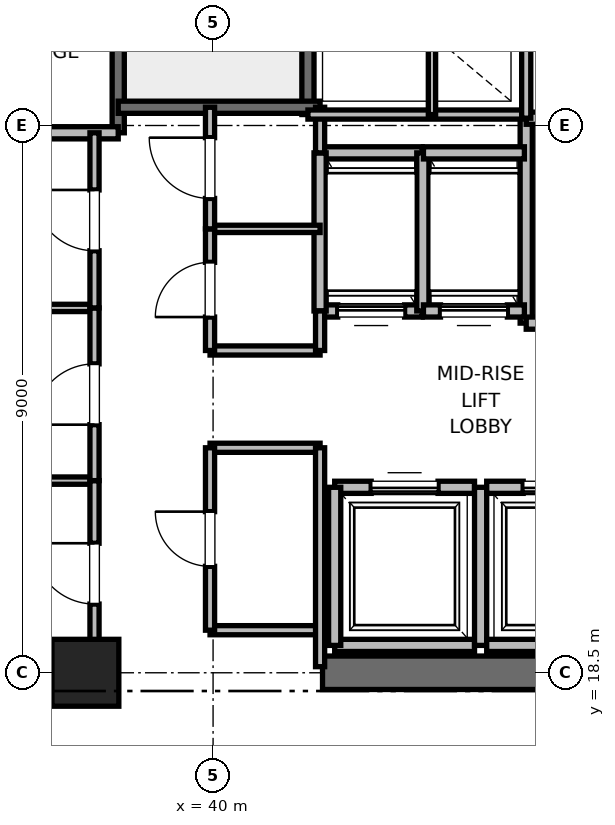
"""IFC4 building model, lengths in metres.
Left out: names, types, materials, properties, quantities, classifications, styles, units other than length and angle.
Written with IfcOpenShell. Run it as: python <this file> out.ifc"""

import sys

from ifc_helpers import new_model, si_unit, direction, frame, frame_2d, origin, origin_2d, place, context, subcontext, project, spatial, rectangle, extrude, element, fill, save


model = new_model("IFC4")
c1 = context("Model", 3, precision=1e-05, world=origin(), true_north=direction((0.0, 1.0)))
c2 = subcontext(c1, "Body", "Model", "MODEL_VIEW")
j1 = project(units=[si_unit("LENGTHUNIT", "METRE"), si_unit("PLANEANGLEUNIT", "RADIAN")], contexts=[c1])
p1 = place(None, origin())
s1 = spatial("IfcSite", under=j1, at=p1, CompositionType="ELEMENT")
p2 = place(p1, origin())
s2 = spatial("IfcBuilding", under=s1, at=p2, CompositionType="ELEMENT")
p3 = place(p2, frame((0.0, 0.0, 148.4)))
s3 = spatial("IfcBuildingStorey", under=s2, at=p3, CompositionType="ELEMENT", Elevation=148.4)
p4 = place(p3, frame((37.9, 18.5, 0.0), z_axis=(0.0, 0.0, 1.0), x_axis=(1.0, 0.0, 0.0)))
e1 = element("IfcColumn", 1, at=p4, inside=s3, PredefinedType="PILASTER", context=c2, shape_type="SweptSolid", body=[
    extrude(rectangle(XDim=1.1, YDim=1.1, at=origin_2d()), origin(), (0.0, 0.0, 1.0), 4.0),
])
for number, where, z_axis, x_axis in (
    (2, (29.0, 18.5, 0.0), (0.0, 0.0, 1.0), (1.0, 0.0, 0.0)),
    (3, (41.8, 18.5, 0.0), (0.0, 0.0, 1.0), (1.0, 0.0, 0.0)),
):
    element("IfcWall", number, at=place(p3, frame(where, z_axis=z_axis, x_axis=x_axis)), inside=s3, PredefinedType="SHEAR", context=c2, shape_type="SweptSolid", body=[
        extrude(rectangle(XDim=9.2, YDim=0.55, at=frame_2d((4.6, 0.0))), origin(), (0.0, 0.0, 1.0), 3.775),
    ])
p5 = place(p3, frame((38.44, 27.38, 0.0), z_axis=(0.0, 0.0, 1.0), x_axis=(0.0, 1.0, 0.0)))
e4 = element("IfcWall", 4, at=p5, inside=s3, PredefinedType="SOLIDWALL", context=c2, shape_type="SweptSolid", body=[
    extrude(rectangle(XDim=8.87, YDim=0.2, at=frame_2d((4.435, 0.0))), origin(), (0.0, 0.0, 1.0), 3.775),
])
p6 = place(p3, frame((41.56, 27.68, 0.0), z_axis=(0.0, 0.0, 1.0), x_axis=(0.0, 1.0, 0.0)))
e5 = element("IfcWall", 5, at=p6, inside=s3, PredefinedType="SOLIDWALL", context=c2, shape_type="SweptSolid", body=[
    extrude(rectangle(XDim=8.57, YDim=0.2, at=frame_2d((4.285, 0.0))), origin(), (0.0, 0.0, 1.0), 3.775),
])
p7 = place(p3, frame((38.44, 27.8, 0.0), z_axis=(0.0, 0.0, 1.0), x_axis=(1.0, 0.0, 0.0)))
e6 = element("IfcWall", 6, at=p7, inside=s3, PredefinedType="SOLIDWALL", context=c2, shape_type="SweptSolid", body=[
    extrude(rectangle(XDim=3.32, YDim=0.2, at=frame_2d((1.66, 0.0))), origin(), (0.0, 0.0, 1.0), 3.775),
])
p8 = place(p3, frame((32.82, 27.38, 0.0), z_axis=(0.0, 0.0, 1.0), x_axis=(1.0, 0.0, 0.0)))
e7 = element("IfcWall", 7, at=p8, inside=s3, PredefinedType="PARTITIONING", context=c2, shape_type="SweptSolid", body=[
    extrude(rectangle(XDim=5.62, YDim=0.2, at=frame_2d((2.81, 0.0))), origin(), (0.0, 0.0, 1.0), 3.775),
])
p9 = place(p3, frame((45.15, 24.25, 0.0), z_axis=(0.0, 0.0, 1.0), x_axis=(0.0, 1.0, 0.0)))
e8 = element("IfcWall", 8, at=p9, inside=s3, PredefinedType="PARTITIONING", context=c2, shape_type="SweptSolid", body=[
    extrude(rectangle(XDim=3.37, YDim=0.2, at=frame_2d((1.685, 0.0))), origin(), (0.0, 0.0, 1.0), 3.775),
])
p10 = place(p3, frame((45.15, 24.25, 0.0), z_axis=(0.0, 0.0, 1.0), x_axis=(1.0, 0.0, 0.0)))
e9 = element("IfcWall", 9, at=p10, inside=s3, PredefinedType="PARTITIONING", context=c2, shape_type="SweptSolid", body=[
    extrude(rectangle(XDim=2.7, YDim=0.2, at=frame_2d((1.35, 0.0))), origin(), (0.0, 0.0, 1.0), 3.775),
])
p11 = place(p10, frame((0.775, 0.0, 0.0)))
e10 = element("IfcOpeningElement", 10, at=p11, cuts=e9, PredefinedType="OPENING", context=c2, shape_type="SweptSolid", body=[
    extrude(rectangle(XDim=1.15, YDim=2.2, at=frame_2d((0.575, 1.1))), frame((0.0, 0.1, 0.0), z_axis=(0.0, -1.0, 0.0), x_axis=(1.0, 0.0, 0.0)), (0.0, 0.0, 1.0), 0.2),
])
p12 = place(p3, frame((45.15, 27.62, 0.0), z_axis=(0.0, 0.0, 1.0), x_axis=(1.0, 0.0, 0.0)))
e11 = element("IfcWall", 11, at=p12, inside=s3, PredefinedType="PARTITIONING", context=c2, shape_type="SweptSolid", body=[
    extrude(rectangle(XDim=2.03, YDim=0.2, at=frame_2d((1.015, 0.0))), origin(), (0.0, 0.0, 1.0), 3.775),
])
p13 = place(p12, frame((0.44, 0.0, 0.0)))
e12 = element("IfcOpeningElement", 12, at=p13, cuts=e11, PredefinedType="OPENING", context=c2, shape_type="SweptSolid", body=[
    extrude(rectangle(XDim=1.15, YDim=2.2, at=frame_2d((0.575, 1.1))), frame((0.0, 0.1, 0.0), z_axis=(0.0, -1.0, 0.0), x_axis=(1.0, 0.0, 0.0)), (0.0, 0.0, 1.0), 0.2),
])
p14 = place(p3, frame((42.0, 18.95, 0.0), z_axis=(0.0, 0.0, 1.0), x_axis=(1.0, 0.0, 0.0)))
e13 = element("IfcWall", 13, at=p14, inside=s3, PredefinedType="SOLIDWALL", context=c2, shape_type="SweptSolid", body=[
    extrude(rectangle(XDim=2.3, YDim=0.2, at=frame_2d((1.15, 0.0))), origin(), (0.0, 0.0, 1.0), 2.755),
])
p15 = place(p3, frame((44.3, 21.55, 0.0), z_axis=(0.0, 0.0, 1.0), x_axis=(-1.0, 0.0, 0.0)))
e14 = element("IfcWall", 14, at=p15, inside=s3, PredefinedType="SOLIDWALL", context=c2, shape_type="SweptSolid", body=[
    extrude(rectangle(XDim=2.3, YDim=0.2, at=frame_2d((1.15, 0.0))), origin(), (0.0, 0.0, 1.0), 3.775),
])
p16 = place(p15, frame((0.6, 0.0, 0.0)))
e15 = element("IfcOpeningElement", 15, at=p16, cuts=e14, PredefinedType="OPENING", context=c2, shape_type="SweptSolid", body=[
    extrude(rectangle(XDim=1.1, YDim=2.2, at=frame_2d((0.55, 1.1))), frame((0.0, 0.1, 0.0), z_axis=(0.0, -1.0, 0.0), x_axis=(1.0, 0.0, 0.0)), (0.0, 0.0, 1.0), 0.2),
])
p17 = place(p3, frame((42.0, 21.55, 0.0), z_axis=(0.0, 0.0, 1.0), x_axis=(0.0, -1.0, 0.0)))
e16 = element("IfcWall", 16, at=p17, inside=s3, PredefinedType="SOLIDWALL", context=c2, shape_type="SweptSolid", body=[
    extrude(rectangle(XDim=2.6, YDim=0.2, at=frame_2d((1.3, 0.0))), origin(), (0.0, 0.0, 1.0), 2.755),
])
p18 = place(p3, frame((44.4, 18.95, 0.0), z_axis=(0.0, 0.0, 1.0), x_axis=(0.0, 1.0, 0.0)))
e17 = element("IfcWall", 17, at=p18, inside=s3, PredefinedType="SOLIDWALL", context=c2, shape_type="SweptSolid", body=[
    extrude(rectangle(XDim=2.6, YDim=0.2, at=frame_2d((1.3, 0.0))), origin(), (0.0, 0.0, 1.0), 3.775),
])
p19 = place(p3, frame((44.5, 18.95, 0.0), z_axis=(0.0, 0.0, 1.0), x_axis=(1.0, 0.0, 0.0)))
e18 = element("IfcWall", 18, at=p19, inside=s3, PredefinedType="SOLIDWALL", context=c2, shape_type="SweptSolid", body=[
    extrude(rectangle(XDim=2.3, YDim=0.2, at=frame_2d((1.15, 0.0))), origin(), (0.0, 0.0, 1.0), 3.775),
])
p20 = place(p3, frame((46.8, 21.55, 0.0), z_axis=(0.0, 0.0, 1.0), x_axis=(-1.0, 0.0, 0.0)))
e19 = element("IfcWall", 19, at=p20, inside=s3, PredefinedType="SOLIDWALL", context=c2, shape_type="SweptSolid", body=[
    extrude(rectangle(XDim=2.3, YDim=0.2, at=frame_2d((1.15, 0.0))), origin(), (0.0, 0.0, 1.0), 3.775),
])
p21 = place(p20, frame((0.6, 0.0, 0.0)))
e20 = element("IfcOpeningElement", 20, at=p21, cuts=e19, PredefinedType="OPENING", context=c2, shape_type="SweptSolid", body=[
    extrude(rectangle(XDim=1.1, YDim=2.2, at=frame_2d((0.55, 1.1))), frame((0.0, 0.1, 0.0), z_axis=(0.0, -1.0, 0.0), x_axis=(1.0, 0.0, 0.0)), (0.0, 0.0, 1.0), 0.2),
])
p22 = place(p3, frame((41.76, 24.45, 0.0), z_axis=(0.0, 0.0, 1.0), x_axis=(1.0, 0.0, 0.0)))
e21 = element("IfcWall", 21, at=p22, inside=s3, PredefinedType="SOLIDWALL", context=c2, shape_type="SweptSolid", body=[
    extrude(rectangle(XDim=1.68, YDim=0.2, at=frame_2d((0.84, 0.0))), origin(), (0.0, 0.0, 1.0), 3.775),
])
p23 = place(p22, frame((0.29, 0.0, 0.0)))
e22 = element("IfcOpeningElement", 22, at=p23, cuts=e21, PredefinedType="OPENING", context=c2, shape_type="SweptSolid", body=[
    extrude(rectangle(XDim=1.1, YDim=2.2, at=frame_2d((0.55, 1.1))), frame((0.0, 0.1, 0.0), z_axis=(0.0, -1.0, 0.0), x_axis=(1.0, 0.0, 0.0)), (0.0, 0.0, 1.0), 0.2),
])
p24 = place(p3, frame((43.44, 27.05, 0.0), z_axis=(0.0, 0.0, 1.0), x_axis=(-1.0, 0.0, 0.0)))
e23 = element("IfcWall", 23, at=p24, inside=s3, PredefinedType="SOLIDWALL", context=c2, shape_type="SweptSolid", body=[
    extrude(rectangle(XDim=1.68, YDim=0.2, at=frame_2d((0.84, 0.0))), origin(), (0.0, 0.0, 1.0), 3.775),
])
for number, where, z_axis, x_axis in (
    (24, (41.76, 27.05, 0.0), (0.0, 0.0, 1.0), (0.0, -1.0, 0.0)),
    (25, (43.45, 24.45, 0.0), (0.0, 0.0, 1.0), (0.0, 1.0, 0.0)),
):
    element("IfcWall", number, at=place(p3, frame(where, z_axis=z_axis, x_axis=x_axis)), inside=s3, PredefinedType="SOLIDWALL", context=c2, shape_type="SweptSolid", body=[
        extrude(rectangle(XDim=2.6, YDim=0.2, at=frame_2d((1.3, 0.0))), origin(), (0.0, 0.0, 1.0), 3.775),
    ])
p25 = place(p3, frame((43.46, 24.45, 0.0), z_axis=(0.0, 0.0, 1.0), x_axis=(1.0, 0.0, 0.0)))
e26 = element("IfcWall", 26, at=p25, inside=s3, PredefinedType="SOLIDWALL", context=c2, shape_type="SweptSolid", body=[
    extrude(rectangle(XDim=1.66, YDim=0.2, at=frame_2d((0.83, 0.0))), origin(), (0.0, 0.0, 1.0), 3.775),
])
p26 = place(p25, frame((0.28, 0.0, 0.0)))
e27 = element("IfcOpeningElement", 27, at=p26, cuts=e26, PredefinedType="OPENING", context=c2, shape_type="SweptSolid", body=[
    extrude(rectangle(XDim=1.1, YDim=2.2, at=frame_2d((0.55, 1.1))), frame((0.0, 0.1, 0.0), z_axis=(0.0, -1.0, 0.0), x_axis=(1.0, 0.0, 0.0)), (0.0, 0.0, 1.0), 0.2),
])
p27 = place(p3, frame((45.12, 27.05, 0.0), z_axis=(0.0, 0.0, 1.0), x_axis=(-1.0, 0.0, 0.0)))
e28 = element("IfcWall", 28, at=p27, inside=s3, PredefinedType="SOLIDWALL", context=c2, shape_type="SweptSolid", body=[
    extrude(rectangle(XDim=1.66, YDim=0.2, at=frame_2d((0.83, 0.0))), origin(), (0.0, 0.0, 1.0), 3.775),
])
for number, where, z_axis, x_axis in (
    (29, (39.95, 19.2, 0.0), (0.0, 0.0, 1.0), (1.0, 0.0, 0.0)),
    (30, (39.95, 22.2, 0.0), (0.0, 0.0, 1.0), (1.0, 0.0, 0.0)),
    (31, (39.95, 23.8, 0.0), (0.0, 0.0, 1.0), (1.0, 0.0, 0.0)),
):
    element("IfcWall", number, at=place(p3, frame(where, z_axis=z_axis, x_axis=x_axis)), inside=s3, PredefinedType="PARTITIONING", context=c2, shape_type="SweptSolid", body=[
        extrude(rectangle(XDim=1.81, YDim=0.15, at=frame_2d((0.905, 0.0))), origin(), (0.0, 0.0, 1.0), 2.85),
    ])
p28 = place(p3, frame((39.95, 25.8, 0.0), z_axis=(0.0, 0.0, 1.0), x_axis=(1.0, 0.0, 0.0)))
e32 = element("IfcWall", 32, at=p28, inside=s3, PredefinedType="PARTITIONING", context=c2, shape_type="SweptSolid", body=[
    extrude(rectangle(XDim=1.81, YDim=0.12, at=frame_2d((0.905, 0.0))), origin(), (0.0, 0.0, 1.0), 2.85),
])
p29 = place(p3, frame((41.76, 18.6, 0.0), z_axis=(0.0, 0.0, 1.0), x_axis=(0.0, 1.0, 0.0)))
e33 = element("IfcWall", 33, at=p29, inside=s3, PredefinedType="PARTITIONING", context=c2, shape_type="SweptSolid", body=[
    extrude(rectangle(XDim=3.6, YDim=0.15, at=frame_2d((1.8, 0.0))), origin(), (0.0, 0.0, 1.0), 2.755),
])
p30 = place(p3, frame((41.76, 23.8, 0.0), z_axis=(0.0, 0.0, 1.0), x_axis=(0.0, 1.0, 0.0)))
e34 = element("IfcWall", 34, at=p30, inside=s3, PredefinedType="PARTITIONING", context=c2, shape_type="SweptSolid", body=[
    extrude(rectangle(XDim=0.65, YDim=0.15, at=frame_2d((0.325, 0.0))), origin(), (0.0, 0.0, 1.0), 2.85),
])
p31 = place(p3, frame((41.76, 27.05, 0.0), z_axis=(0.0, 0.0, 1.0), x_axis=(0.0, 1.0, 0.0)))
e35 = element("IfcWall", 35, at=p31, inside=s3, PredefinedType="PARTITIONING", context=c2, shape_type="SweptSolid", body=[
    extrude(rectangle(XDim=0.75, YDim=0.15, at=frame_2d((0.375, 0.0))), origin(), (0.0, 0.0, 1.0), 2.85),
])
p32 = place(p3, frame((39.95, 19.2, 0.0), z_axis=(0.0, 0.0, 1.0), x_axis=(0.0, 1.0, 0.0)))
e36 = element("IfcWall", 36, at=p32, inside=s3, PredefinedType="PARTITIONING", context=c2, shape_type="SweptSolid", body=[
    extrude(rectangle(XDim=3.0, YDim=0.15, at=frame_2d((1.5, 0.0))), origin(), (0.0, 0.0, 1.0), 2.85),
])
p33 = place(p32, frame((1.05, 0.0, 0.0)))
e37 = element("IfcOpeningElement", 37, at=p33, cuts=e36, PredefinedType="OPENING", context=c2, shape_type="SweptSolid", body=[
    extrude(rectangle(XDim=0.9, YDim=2.1, at=frame_2d((0.45, 1.05))), frame((0.0, 0.075, 0.0), z_axis=(0.0, -1.0, 0.0), x_axis=(1.0, 0.0, 0.0)), (0.0, 0.0, 1.0), 0.15),
])
p34 = place(p3, frame((39.95, 23.8, 0.0), z_axis=(0.0, 0.0, 1.0), x_axis=(0.0, 1.0, 0.0)))
e38 = element("IfcWall", 38, at=p34, inside=s3, PredefinedType="PARTITIONING", context=c2, shape_type="SweptSolid", body=[
    extrude(rectangle(XDim=2.0, YDim=0.15, at=frame_2d((1.0, 0.0))), origin(), (0.0, 0.0, 1.0), 2.85),
])
p35 = place(p34, frame((0.55, 0.0, 0.0)))
e39 = element("IfcOpeningElement", 39, at=p35, cuts=e38, PredefinedType="OPENING", context=c2, shape_type="SweptSolid", body=[
    extrude(rectangle(XDim=0.9, YDim=2.1, at=frame_2d((0.45, 1.05))), frame((0.0, 0.075, 0.0), z_axis=(0.0, -1.0, 0.0), x_axis=(1.0, 0.0, 0.0)), (0.0, 0.0, 1.0), 0.15),
])
p36 = place(p3, frame((39.95, 25.8, 0.0), z_axis=(0.0, 0.0, 1.0), x_axis=(0.0, 1.0, 0.0)))
e40 = element("IfcWall", 40, at=p36, inside=s3, PredefinedType="PARTITIONING", context=c2, shape_type="SweptSolid", body=[
    extrude(rectangle(XDim=2.0, YDim=0.15, at=frame_2d((1.0, 0.0))), origin(), (0.0, 0.0, 1.0), 2.85),
])
p37 = place(p36, frame((0.5, 0.0, 0.0)))
e41 = element("IfcOpeningElement", 41, at=p37, cuts=e40, PredefinedType="OPENING", context=c2, shape_type="SweptSolid", body=[
    extrude(rectangle(XDim=1.0, YDim=2.15, at=frame_2d((0.5, 1.075))), frame((0.0, 0.075, 0.0), z_axis=(0.0, -1.0, 0.0), x_axis=(1.0, 0.0, 0.0)), (0.0, 0.0, 1.0), 0.15),
])
for number, where, z_axis, x_axis in (
    (42, (32.82, 21.66, 0.0), (0.0, 0.0, 1.0), (1.0, 0.0, 0.0)),
    (43, (32.82, 24.5, 0.0), (0.0, 0.0, 1.0), (1.0, 0.0, 0.0)),
):
    element("IfcWall", number, at=place(p3, frame(where, z_axis=z_axis, x_axis=x_axis)), inside=s3, PredefinedType="PARTITIONING", context=c2, shape_type="SweptSolid", body=[
        extrude(rectangle(XDim=5.23, YDim=0.12, at=frame_2d((2.615, 0.0))), origin(), (0.0, 0.0, 1.0), 2.85),
    ])
p38 = place(p3, frame((38.05, 18.6, 0.0), z_axis=(0.0, 0.0, 1.0), x_axis=(0.0, 1.0, 0.0)))
e44 = element("IfcWall", 44, at=p38, inside=s3, PredefinedType="PARTITIONING", context=c2, shape_type="SweptSolid", body=[
    extrude(rectangle(XDim=3.06, YDim=0.15, at=frame_2d((1.53, 0.0))), origin(), (0.0, 0.0, 1.0), 2.755),
])
p39 = place(p38, frame((1.03, 0.0, 0.0)))
e45 = element("IfcOpeningElement", 45, at=p39, cuts=e44, PredefinedType="OPENING", context=c2, shape_type="SweptSolid", body=[
    extrude(rectangle(XDim=1.0, YDim=2.15, at=frame_2d((0.5, 1.075))), frame((0.0, 0.075, 0.0), z_axis=(0.0, -1.0, 0.0), x_axis=(1.0, 0.0, 0.0)), (0.0, 0.0, 1.0), 0.15),
])
p40 = place(p3, frame((38.05, 21.66, 0.0), z_axis=(0.0, 0.0, 1.0), x_axis=(0.0, 1.0, 0.0)))
e46 = element("IfcWall", 46, at=p40, inside=s3, PredefinedType="PARTITIONING", context=c2, shape_type="SweptSolid", body=[
    extrude(rectangle(XDim=2.84, YDim=0.15, at=frame_2d((1.42, 0.0))), origin(), (0.0, 0.0, 1.0), 2.85),
])
p41 = place(p40, frame((0.92, 0.0, 0.0)))
e47 = element("IfcOpeningElement", 47, at=p41, cuts=e46, PredefinedType="OPENING", context=c2, shape_type="SweptSolid", body=[
    extrude(rectangle(XDim=1.0, YDim=2.15, at=frame_2d((0.5, 1.075))), frame((0.0, 0.075, 0.0), z_axis=(0.0, -1.0, 0.0), x_axis=(1.0, 0.0, 0.0)), (0.0, 0.0, 1.0), 0.15),
])
p42 = place(p3, frame((38.05, 24.5, 0.0), z_axis=(0.0, 0.0, 1.0), x_axis=(0.0, 1.0, 0.0)))
e48 = element("IfcWall", 48, at=p42, inside=s3, PredefinedType="PARTITIONING", context=c2, shape_type="SweptSolid", body=[
    extrude(rectangle(XDim=2.88, YDim=0.15, at=frame_2d((1.44, 0.0))), origin(), (0.0, 0.0, 1.0), 2.85),
])
p43 = place(p42, frame((0.94, 0.0, 0.0)))
e49 = element("IfcOpeningElement", 49, at=p43, cuts=e48, PredefinedType="OPENING", context=c2, shape_type="SweptSolid", body=[
    extrude(rectangle(XDim=1.0, YDim=2.15, at=frame_2d((0.5, 1.075))), frame((0.0, 0.075, 0.0), z_axis=(0.0, -1.0, 0.0), x_axis=(1.0, 0.0, 0.0)), (0.0, 0.0, 1.0), 0.15),
])
p44 = place(p3, frame((41.56, 27.68, 0.0), z_axis=(0.0, 0.0, 1.0), x_axis=(1.0, 0.0, 0.0)))
e50 = element("IfcWall", 50, at=p44, inside=s3, PredefinedType="PARTITIONING", context=c2, shape_type="SweptSolid", body=[
    extrude(rectangle(XDim=3.59, YDim=0.15, at=frame_2d((1.795, 0.0))), origin(), (0.0, 0.0, 1.0), 2.85),
])
p45 = place(p3, frame((45.15, 27.62, 0.0), z_axis=(0.0, 0.0, 1.0), x_axis=(0.0, 1.0, 0.0)))
e51 = element("IfcWall", 51, at=p45, inside=s3, PredefinedType="PARTITIONING", context=c2, shape_type="SweptSolid", body=[
    extrude(rectangle(XDim=3.1, YDim=0.15, at=frame_2d((1.55, 0.0))), origin(), (0.0, 0.0, 1.0), 2.85),
])
p46 = place(p3, frame((43.6, 27.68, 0.0), z_axis=(0.0, 0.0, 1.0), x_axis=(0.0, 1.0, 0.0)))
e52 = element("IfcWall", 52, at=p46, inside=s3, PredefinedType="PARTITIONING", context=c2, shape_type="SweptSolid", body=[
    extrude(rectangle(XDim=3.04, YDim=0.12, at=frame_2d((1.52, 0.0))), origin(), (0.0, 0.0, 1.0), 2.85),
])
p47 = place(p16, origin())
e53 = element("IfcDoor", 53, at=p47, inside=s3, OperationType="SLIDING_TO_RIGHT", PredefinedType="DOOR", context=c2, shape_type="SweptSolid", body=[
    extrude(rectangle(XDim=1.1, YDim=2.2, at=frame_2d((0.55, 1.1))), frame((0.0, 0.025, 0.0), z_axis=(0.0, -1.0, 0.0), x_axis=(1.0, 0.0, 0.0)), (0.0, 0.0, 1.0), 0.05),
])
fill(e15, e53)
p48 = place(p21, origin())
e54 = element("IfcDoor", 54, at=p48, inside=s3, OperationType="SLIDING_TO_RIGHT", PredefinedType="DOOR", context=c2, shape_type="SweptSolid", body=[
    extrude(rectangle(XDim=1.1, YDim=2.2, at=frame_2d((0.55, 1.1))), frame((0.0, 0.025, 0.0), z_axis=(0.0, -1.0, 0.0), x_axis=(1.0, 0.0, 0.0)), (0.0, 0.0, 1.0), 0.05),
])
fill(e20, e54)
p49 = place(p23, origin())
e55 = element("IfcDoor", 55, at=p49, inside=s3, OperationType="SLIDING_TO_RIGHT", PredefinedType="DOOR", context=c2, shape_type="SweptSolid", body=[
    extrude(rectangle(XDim=1.1, YDim=2.2, at=frame_2d((0.55, 1.1))), frame((0.0, 0.025, 0.0), z_axis=(0.0, -1.0, 0.0), x_axis=(1.0, 0.0, 0.0)), (0.0, 0.0, 1.0), 0.05),
])
fill(e22, e55)
p50 = place(p26, origin())
e56 = element("IfcDoor", 56, at=p50, inside=s3, OperationType="SLIDING_TO_RIGHT", PredefinedType="DOOR", context=c2, shape_type="SweptSolid", body=[
    extrude(rectangle(XDim=1.1, YDim=2.2, at=frame_2d((0.55, 1.1))), frame((0.0, 0.025, 0.0), z_axis=(0.0, -1.0, 0.0), x_axis=(1.0, 0.0, 0.0)), (0.0, 0.0, 1.0), 0.05),
])
fill(e27, e56)
p51 = place(p33, origin())
e57 = element("IfcDoor", 57, at=p51, inside=s3, OperationType="SINGLE_SWING_RIGHT", PredefinedType="DOOR", context=c2, shape_type="SweptSolid", body=[
    extrude(rectangle(XDim=0.9, YDim=2.1, at=frame_2d((0.45, 1.05))), frame((0.0, 0.025, 0.0), z_axis=(0.0, -1.0, 0.0), x_axis=(1.0, 0.0, 0.0)), (0.0, 0.0, 1.0), 0.05),
])
fill(e37, e57)
p52 = place(p35, origin())
e58 = element("IfcDoor", 58, at=p52, inside=s3, OperationType="SINGLE_SWING_LEFT", PredefinedType="DOOR", context=c2, shape_type="SweptSolid", body=[
    extrude(rectangle(XDim=0.9, YDim=2.1, at=frame_2d((0.45, 1.05))), frame((0.0, 0.025, 0.0), z_axis=(0.0, -1.0, 0.0), x_axis=(1.0, 0.0, 0.0)), (0.0, 0.0, 1.0), 0.05),
])
fill(e39, e58)
p53 = place(p37, origin())
e59 = element("IfcDoor", 59, at=p53, inside=s3, OperationType="SINGLE_SWING_RIGHT", PredefinedType="DOOR", context=c2, shape_type="SweptSolid", body=[
    extrude(rectangle(XDim=1.0, YDim=2.15, at=frame_2d((0.5, 1.075))), frame((0.0, 0.025, 0.0), z_axis=(0.0, -1.0, 0.0), x_axis=(1.0, 0.0, 0.0)), (0.0, 0.0, 1.0), 0.05),
])
fill(e41, e59)
p54 = place(p39, origin())
e60 = element("IfcDoor", 60, at=p54, inside=s3, OperationType="SINGLE_SWING_RIGHT", PredefinedType="DOOR", context=c2, shape_type="SweptSolid", body=[
    extrude(rectangle(XDim=1.0, YDim=2.15, at=frame_2d((0.5, 1.075))), frame((0.0, 0.025, 0.0), z_axis=(0.0, -1.0, 0.0), x_axis=(1.0, 0.0, 0.0)), (0.0, 0.0, 1.0), 0.05),
])
fill(e45, e60)
p55 = place(p41, origin())
e61 = element("IfcDoor", 61, at=p55, inside=s3, OperationType="SINGLE_SWING_LEFT", PredefinedType="DOOR", context=c2, shape_type="SweptSolid", body=[
    extrude(rectangle(XDim=1.0, YDim=2.15, at=frame_2d((0.5, 1.075))), frame((0.0, 0.025, 0.0), z_axis=(0.0, -1.0, 0.0), x_axis=(1.0, 0.0, 0.0)), (0.0, 0.0, 1.0), 0.05),
])
fill(e47, e61)
p56 = place(p43, origin())
e62 = element("IfcDoor", 62, at=p56, inside=s3, OperationType="SINGLE_SWING_RIGHT", PredefinedType="DOOR", context=c2, shape_type="SweptSolid", body=[
    extrude(rectangle(XDim=1.0, YDim=2.15, at=frame_2d((0.5, 1.075))), frame((0.0, 0.025, 0.0), z_axis=(0.0, -1.0, 0.0), x_axis=(1.0, 0.0, 0.0)), (0.0, 0.0, 1.0), 0.05),
])
fill(e49, e62)
save(model, sys.argv[1])
